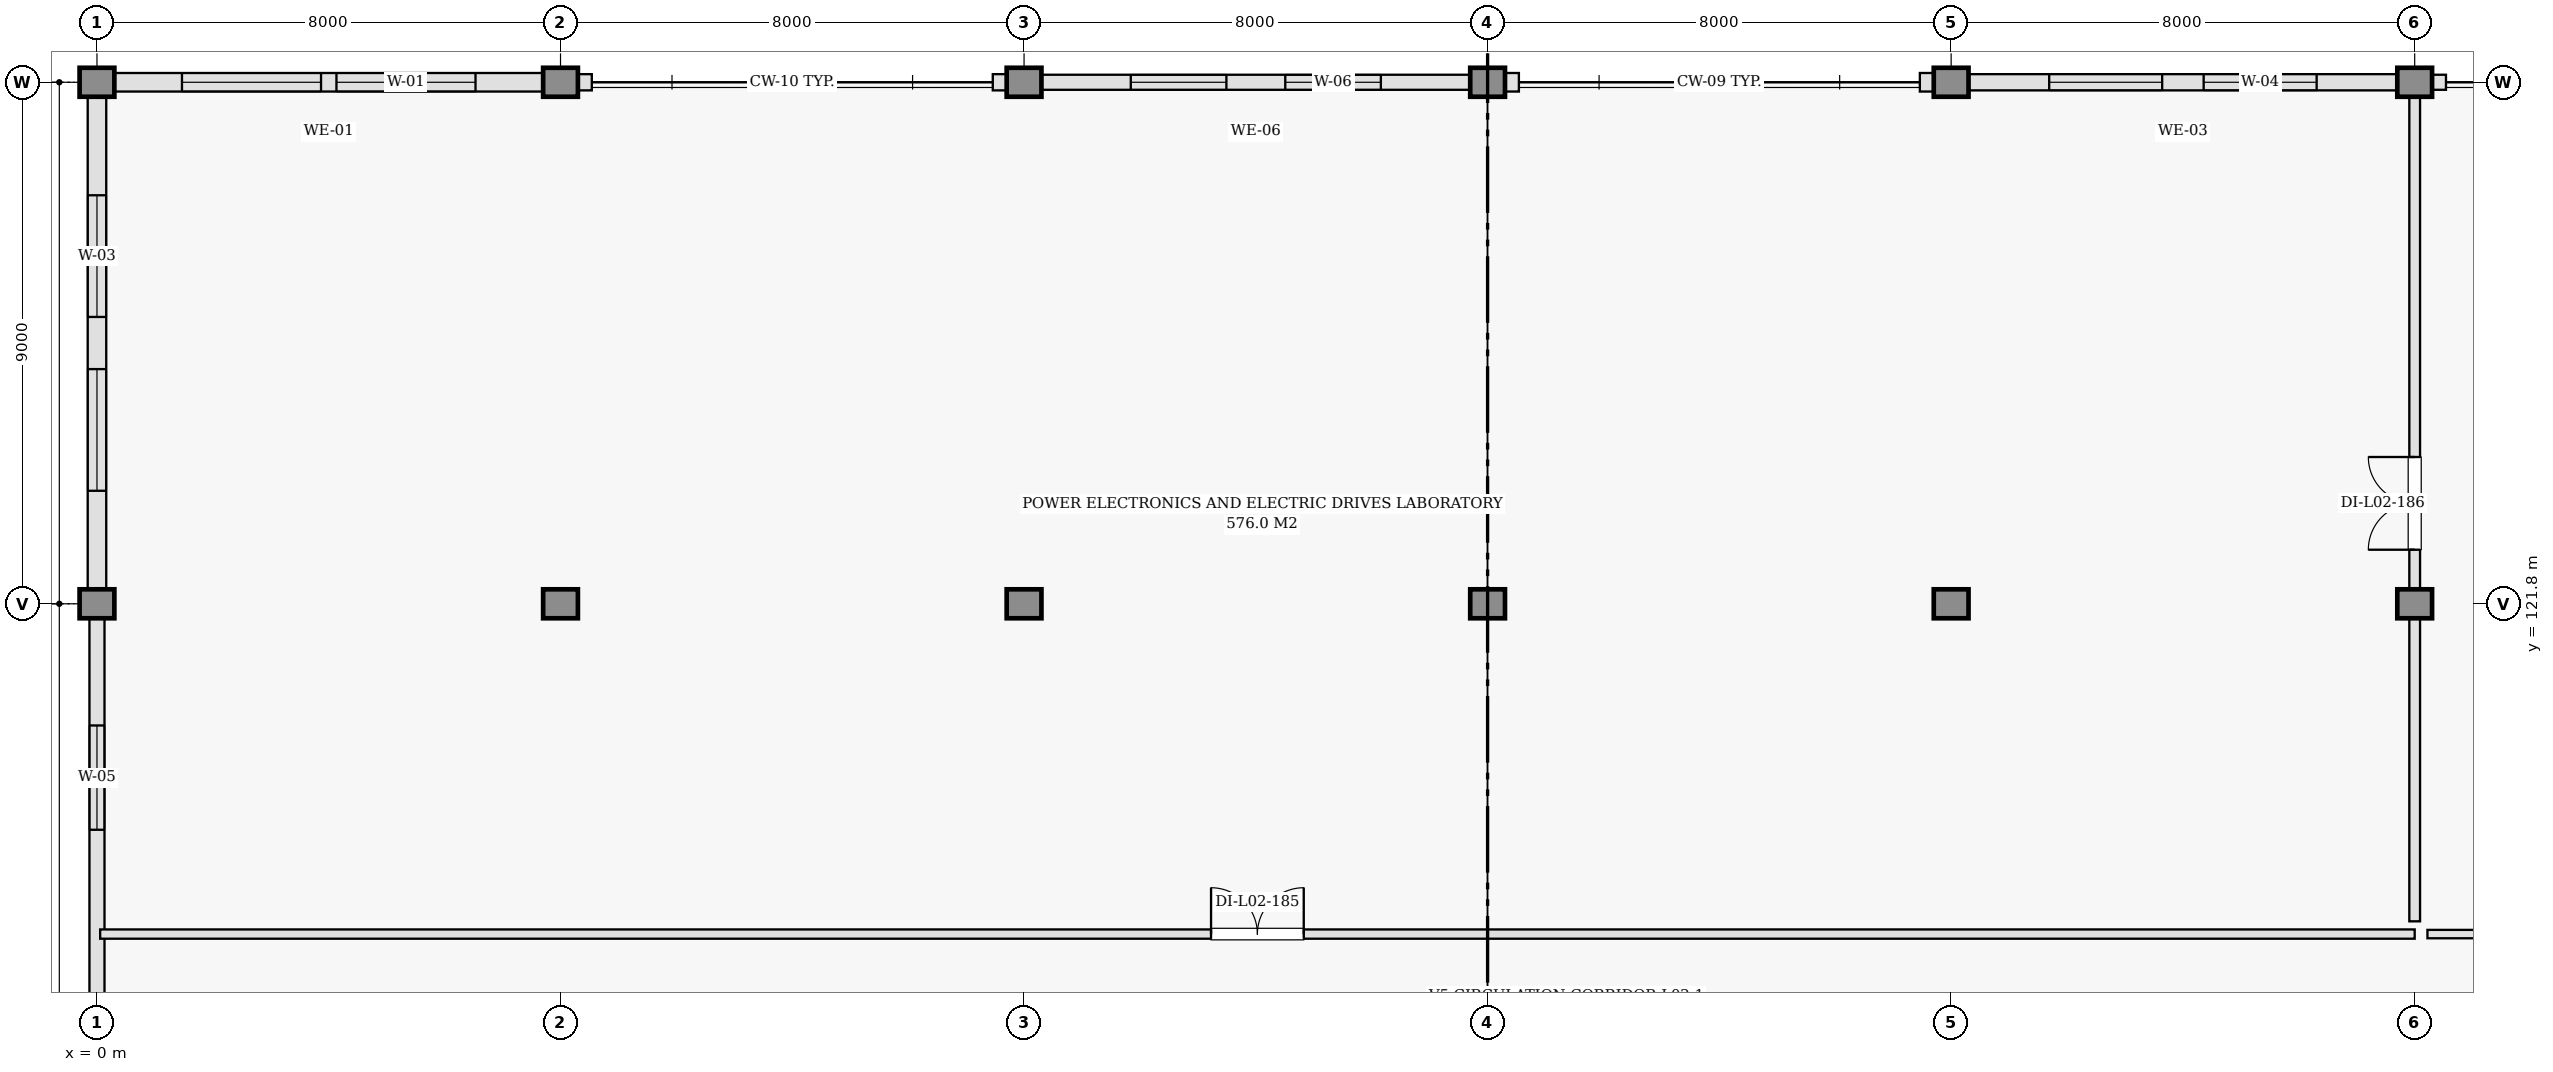
"""IFC4 building model, lengths in metres.
Left out: names, types, materials, properties, quantities, classifications, styles, units other than length and angle.
Written with IfcOpenShell. Run it as: python <this file> out.ifc"""

import sys

from ifc_helpers import new_model, si_unit, direction, frame, frame_2d, origin, origin_2d, place, context, subcontext, project, spatial, rectangle, extrude, element, fill, save


model = new_model("IFC4")
c1 = context("Model", 3, precision=1e-05, world=origin(), true_north=direction((0.0, 1.0)))
c2 = subcontext(c1, "Body", "Model", "MODEL_VIEW")
j1 = project(units=[si_unit("LENGTHUNIT", "METRE"), si_unit("PLANEANGLEUNIT", "RADIAN")], contexts=[c1])
p1 = place(None, origin())
s1 = spatial("IfcSite", under=j1, at=p1, CompositionType="ELEMENT")
p2 = place(p1, origin())
s2 = spatial("IfcBuilding", under=s1, at=p2, CompositionType="ELEMENT")
p3 = place(p2, frame((0.0, 0.0, 9.6)))
s3 = spatial("IfcBuildingStorey", under=s2, at=p3, CompositionType="ELEMENT", Elevation=9.6)
for number, where, z_axis, x_axis in (
    (1, (0.0, 121.8, 0.0), (0.0, 0.0, 1.0), (1.0, 0.0, 0.0)),
    (2, (0.0, 130.8, 0.0), (0.0, 0.0, 1.0), (1.0, 0.0, 0.0)),
    (3, (8.0, 121.8, 0.0), (0.0, 0.0, 1.0), (1.0, 0.0, 0.0)),
    (4, (8.0, 130.8, 0.0), (0.0, 0.0, 1.0), (1.0, 0.0, 0.0)),
    (5, (16.0, 121.8, 0.0), (0.0, 0.0, 1.0), (1.0, 0.0, 0.0)),
    (6, (16.0, 130.8, 0.0), (0.0, 0.0, 1.0), (1.0, 0.0, 0.0)),
    (7, (24.0, 121.8, 0.0), (0.0, 0.0, 1.0), (1.0, 0.0, 0.0)),
    (8, (24.0, 130.8, 0.0), (0.0, 0.0, 1.0), (1.0, 0.0, 0.0)),
    (9, (32.0, 121.8, 0.0), (0.0, 0.0, 1.0), (1.0, 0.0, 0.0)),
    (10, (32.0, 130.8, 0.0), (0.0, 0.0, 1.0), (1.0, 0.0, 0.0)),
    (11, (40.0, 121.8, 0.0), (0.0, 0.0, 1.0), (1.0, 0.0, 0.0)),
    (12, (40.0, 130.8, 0.0), (0.0, 0.0, 1.0), (1.0, 0.0, 0.0)),
):
    element("IfcColumn", number, at=place(p3, frame(where, z_axis=z_axis, x_axis=x_axis)), inside=s3, PredefinedType="COLUMN", context=c2, shape_type="SweptSolid", body=[
        extrude(rectangle(XDim=0.5, YDim=0.5, at=origin_2d()), origin(), (0.0, 0.0, 1.0), 4.2),
    ])
p4 = place(p3, frame((40.54, 130.8, 0.0), z_axis=(0.0, 0.0, 1.0), x_axis=(-1.0, 0.0, 0.0)))
e13 = element("IfcWall", 13, at=p4, inside=s3, PredefinedType="SOLIDWALL", context=c2, shape_type="SweptSolid", body=[
    extrude(rectangle(XDim=0.54, YDim=0.26, at=frame_2d((0.27, 0.0))), origin(), (0.0, 0.0, 1.0), 3.175),
])
p5 = place(p3, frame((40.0, 130.8, 0.0), z_axis=(0.0, 0.0, 1.0), x_axis=(-1.0, 0.0, 0.0)))
e14 = element("IfcWall", 14, at=p5, inside=s3, PredefinedType="SOLIDWALL", context=c2, shape_type="SweptSolid", body=[
    extrude(rectangle(XDim=8.0, YDim=0.28, at=frame_2d((4.0, 0.0))), origin(), (0.0, 0.0, 1.0), 3.175),
])
p6 = place(p5, frame((1.692, 0.0, 0.95)))
e15 = element("IfcOpeningElement", 15, at=p6, cuts=e14, PredefinedType="OPENING", context=c2, shape_type="SweptSolid", body=[
    extrude(rectangle(XDim=1.95, YDim=1.75, at=frame_2d((0.975, 0.875))), frame((0.0, 0.15, 0.0), z_axis=(0.0, -1.0, 0.0), x_axis=(1.0, 0.0, 0.0)), (0.0, 0.0, 1.0), 0.3),
])
p7 = place(p5, frame((4.358, 0.0, 0.95)))
e16 = element("IfcOpeningElement", 16, at=p7, cuts=e14, PredefinedType="OPENING", context=c2, shape_type="SweptSolid", body=[
    extrude(rectangle(XDim=1.95, YDim=1.75, at=frame_2d((0.975, 0.875))), frame((0.0, 0.15, 0.0), z_axis=(0.0, -1.0, 0.0), x_axis=(1.0, 0.0, 0.0)), (0.0, 0.0, 1.0), 0.3),
])
for number, where, z_axis, x_axis in (
    (17, (32.0, 130.8, 0.0), (0.0, 0.0, 1.0), (-1.0, 0.0, 0.0)),
    (18, (24.54, 130.8, 0.0), (0.0, 0.0, 1.0), (-1.0, 0.0, 0.0)),
):
    element("IfcWall", number, at=place(p3, frame(where, z_axis=z_axis, x_axis=x_axis)), inside=s3, PredefinedType="SOLIDWALL", context=c2, shape_type="SweptSolid", body=[
        extrude(rectangle(XDim=0.54, YDim=0.32, at=frame_2d((0.27, 0.0))), origin(), (0.0, 0.0, 1.0), 3.175),
    ])
p8 = place(p3, frame((24.0, 130.8, 0.0), z_axis=(0.0, 0.0, 1.0), x_axis=(-1.0, 0.0, 0.0)))
e19 = element("IfcWall", 19, at=p8, inside=s3, PredefinedType="SOLIDWALL", context=c2, shape_type="SweptSolid", body=[
    extrude(rectangle(XDim=8.0, YDim=0.26, at=frame_2d((4.0, 0.0))), origin(), (0.0, 0.0, 1.0), 3.175),
])
p9 = place(p8, frame((1.842, 0.0, 0.95)))
e20 = element("IfcOpeningElement", 20, at=p9, cuts=e19, PredefinedType="OPENING", context=c2, shape_type="SweptSolid", body=[
    extrude(rectangle(XDim=1.65, YDim=1.7, at=frame_2d((0.825, 0.85))), frame((0.0, 0.14, 0.0), z_axis=(0.0, -1.0, 0.0), x_axis=(1.0, 0.0, 0.0)), (0.0, 0.0, 1.0), 0.28),
])
p10 = place(p8, frame((4.508, 0.0, 0.95)))
e21 = element("IfcOpeningElement", 21, at=p10, cuts=e19, PredefinedType="OPENING", context=c2, shape_type="SweptSolid", body=[
    extrude(rectangle(XDim=1.65, YDim=1.7, at=frame_2d((0.825, 0.85))), frame((0.0, 0.14, 0.0), z_axis=(0.0, -1.0, 0.0), x_axis=(1.0, 0.0, 0.0)), (0.0, 0.0, 1.0), 0.28),
])
for number, where, z_axis, x_axis in (
    (22, (16.0, 130.8, 0.0), (0.0, 0.0, 1.0), (-1.0, 0.0, 0.0)),
    (23, (8.54, 130.8, 0.0), (0.0, 0.0, 1.0), (-1.0, 0.0, 0.0)),
):
    element("IfcWall", number, at=place(p3, frame(where, z_axis=z_axis, x_axis=x_axis)), inside=s3, PredefinedType="SOLIDWALL", context=c2, shape_type="SweptSolid", body=[
        extrude(rectangle(XDim=0.54, YDim=0.28, at=frame_2d((0.27, 0.0))), origin(), (0.0, 0.0, 1.0), 3.175),
    ])
p11 = place(p3, frame((8.0, 130.8, 0.0), z_axis=(0.0, 0.0, 1.0), x_axis=(-1.0, 0.0, 0.0)))
e24 = element("IfcWall", 24, at=p11, inside=s3, PredefinedType="SOLIDWALL", context=c2, shape_type="SweptSolid", body=[
    extrude(rectangle(XDim=8.0, YDim=0.32, at=frame_2d((4.0, 0.0))), origin(), (0.0, 0.0, 1.0), 3.175),
])
p12 = place(p11, frame((1.467, 0.0, 0.95)))
e25 = element("IfcOpeningElement", 25, at=p12, cuts=e24, PredefinedType="OPENING", context=c2, shape_type="SweptSolid", body=[
    extrude(rectangle(XDim=2.4, YDim=1.8, at=frame_2d((1.2, 0.9))), frame((0.0, 0.17, 0.0), z_axis=(0.0, -1.0, 0.0), x_axis=(1.0, 0.0, 0.0)), (0.0, 0.0, 1.0), 0.34),
])
p13 = place(p11, frame((4.133, 0.0, 0.95)))
e26 = element("IfcOpeningElement", 26, at=p13, cuts=e24, PredefinedType="OPENING", context=c2, shape_type="SweptSolid", body=[
    extrude(rectangle(XDim=2.4, YDim=1.8, at=frame_2d((1.2, 0.9))), frame((0.0, 0.17, 0.0), z_axis=(0.0, -1.0, 0.0), x_axis=(1.0, 0.0, 0.0)), (0.0, 0.0, 1.0), 0.34),
])
p14 = place(p3, frame((0.0, 130.8, 0.0), z_axis=(0.0, 0.0, 1.0), x_axis=(0.0, -1.0, 0.0)))
e27 = element("IfcWall", 27, at=p14, inside=s3, PredefinedType="SOLIDWALL", context=c2, shape_type="SweptSolid", body=[
    extrude(rectangle(XDim=9.0, YDim=0.32, at=frame_2d((4.5, 0.0))), origin(), (0.0, 0.0, 1.0), 3.175),
])
p15 = place(p14, frame((1.95, 0.0, 0.95)))
e28 = element("IfcOpeningElement", 28, at=p15, cuts=e27, PredefinedType="OPENING", context=c2, shape_type="SweptSolid", body=[
    extrude(rectangle(XDim=2.1, YDim=1.8, at=frame_2d((1.05, 0.9))), frame((0.0, 0.17, 0.0), z_axis=(0.0, -1.0, 0.0), x_axis=(1.0, 0.0, 0.0)), (0.0, 0.0, 1.0), 0.34),
])
p16 = place(p14, frame((4.95, 0.0, 0.95)))
e29 = element("IfcOpeningElement", 29, at=p16, cuts=e27, PredefinedType="OPENING", context=c2, shape_type="SweptSolid", body=[
    extrude(rectangle(XDim=2.1, YDim=1.8, at=frame_2d((1.05, 0.9))), frame((0.0, 0.17, 0.0), z_axis=(0.0, -1.0, 0.0), x_axis=(1.0, 0.0, 0.0)), (0.0, 0.0, 1.0), 0.34),
])
p17 = place(p3, frame((0.0, 121.8, 0.0), z_axis=(0.0, 0.0, 1.0), x_axis=(0.0, -1.0, 0.0)))
e30 = element("IfcWall", 30, at=p17, inside=s3, PredefinedType="SOLIDWALL", context=c2, shape_type="SweptSolid", body=[
    extrude(rectangle(XDim=9.0, YDim=0.26, at=frame_2d((4.5, 0.0))), origin(), (0.0, 0.0, 1.0), 3.175),
])
p18 = place(p17, frame((2.1, 0.0, 0.95)))
e31 = element("IfcOpeningElement", 31, at=p18, cuts=e30, PredefinedType="OPENING", context=c2, shape_type="SweptSolid", body=[
    extrude(rectangle(XDim=1.8, YDim=1.75, at=frame_2d((0.9, 0.875))), frame((0.0, 0.14, 0.0), z_axis=(0.0, -1.0, 0.0), x_axis=(1.0, 0.0, 0.0)), (0.0, 0.0, 1.0), 0.28),
])
p19 = place(p3, frame((0.055, 116.1, 0.0), z_axis=(0.0, 0.0, 1.0), x_axis=(1.0, 0.0, 0.0)))
e32 = element("IfcWall", 32, at=p19, inside=s3, PredefinedType="PARTITIONING", context=c2, shape_type="SweptSolid", body=[
    extrude(rectangle(XDim=39.945, YDim=0.16, at=frame_2d((19.973, 0.0))), origin(), (0.0, 0.0, 1.0), 3.275),
])
p20 = place(p19, frame((19.172, 0.0, 0.0)))
e33 = element("IfcOpeningElement", 33, at=p20, cuts=e32, PredefinedType="OPENING", context=c2, shape_type="SweptSolid", body=[
    extrude(rectangle(XDim=1.6, YDim=2.2, at=frame_2d((0.8, 1.1))), frame((0.0, 0.09, 0.0), z_axis=(0.0, -1.0, 0.0), x_axis=(1.0, 0.0, 0.0)), (0.0, 0.0, 1.0), 0.18),
])
p21 = place(p3, frame((40.0, 116.32, 0.0), z_axis=(0.0, 0.0, 1.0), x_axis=(0.0, 1.0, 0.0)))
e34 = element("IfcWall", 34, at=p21, inside=s3, PredefinedType="PARTITIONING", context=c2, shape_type="SweptSolid", body=[
    extrude(rectangle(XDim=14.425, YDim=0.185, at=frame_2d((7.212, 0.0))), origin(), (0.0, 0.0, 1.0), 3.275),
])
p22 = place(p21, frame((6.413, 0.0, 0.0)))
e35 = element("IfcOpeningElement", 35, at=p22, cuts=e34, PredefinedType="OPENING", context=c2, shape_type="SweptSolid", body=[
    extrude(rectangle(XDim=1.6, YDim=2.2, at=frame_2d((0.8, 1.1))), frame((0.0, 0.103, 0.0), z_axis=(0.0, -1.0, 0.0), x_axis=(1.0, 0.0, 0.0)), (0.0, 0.0, 1.0), 0.205),
])
p23 = place(p3, frame((40.22, 116.1, 0.0), z_axis=(0.0, 0.0, 1.0), x_axis=(1.0, 0.0, 0.0)))
e36 = element("IfcWall", 36, at=p23, inside=s3, PredefinedType="PARTITIONING", context=c2, shape_type="SweptSolid", body=[
    extrude(rectangle(XDim=39.78, YDim=0.145, at=frame_2d((19.89, 0.0))), origin(), (0.0, 0.0, 1.0), 3.025),
])
p24 = place(p6, origin())
e37 = element("IfcWindow", 37, at=p24, inside=s3, PartitioningType="DOUBLE_PANEL_VERTICAL", PredefinedType="WINDOW", context=c2, shape_type="SweptSolid", body=[
    extrude(rectangle(XDim=1.95, YDim=1.75, at=frame_2d((0.975, 0.875))), frame((0.0, 0.03, 0.0), z_axis=(0.0, -1.0, 0.0), x_axis=(1.0, 0.0, 0.0)), (0.0, 0.0, 1.0), 0.06),
])
fill(e15, e37)
p25 = place(p7, origin())
e38 = element("IfcWindow", 38, at=p25, inside=s3, PartitioningType="DOUBLE_PANEL_VERTICAL", PredefinedType="WINDOW", context=c2, shape_type="SweptSolid", body=[
    extrude(rectangle(XDim=1.95, YDim=1.75, at=frame_2d((0.975, 0.875))), frame((0.0, 0.03, 0.0), z_axis=(0.0, -1.0, 0.0), x_axis=(1.0, 0.0, 0.0)), (0.0, 0.0, 1.0), 0.06),
])
fill(e16, e38)
p26 = place(p9, origin())
e39 = element("IfcWindow", 39, at=p26, inside=s3, PartitioningType="DOUBLE_PANEL_VERTICAL", PredefinedType="WINDOW", context=c2, shape_type="SweptSolid", body=[
    extrude(rectangle(XDim=1.65, YDim=1.7, at=frame_2d((0.825, 0.85))), frame((0.0, 0.03, 0.0), z_axis=(0.0, -1.0, 0.0), x_axis=(1.0, 0.0, 0.0)), (0.0, 0.0, 1.0), 0.06),
])
fill(e20, e39)
p27 = place(p10, origin())
e40 = element("IfcWindow", 40, at=p27, inside=s3, PartitioningType="DOUBLE_PANEL_VERTICAL", PredefinedType="WINDOW", context=c2, shape_type="SweptSolid", body=[
    extrude(rectangle(XDim=1.65, YDim=1.7, at=frame_2d((0.825, 0.85))), frame((0.0, 0.03, 0.0), z_axis=(0.0, -1.0, 0.0), x_axis=(1.0, 0.0, 0.0)), (0.0, 0.0, 1.0), 0.06),
])
fill(e21, e40)
p28 = place(p12, origin())
e41 = element("IfcWindow", 41, at=p28, inside=s3, PartitioningType="DOUBLE_PANEL_VERTICAL", PredefinedType="WINDOW", context=c2, shape_type="SweptSolid", body=[
    extrude(rectangle(XDim=2.4, YDim=1.8, at=frame_2d((1.2, 0.9))), frame((0.0, 0.03, 0.0), z_axis=(0.0, -1.0, 0.0), x_axis=(1.0, 0.0, 0.0)), (0.0, 0.0, 1.0), 0.06),
])
fill(e25, e41)
p29 = place(p13, origin())
e42 = element("IfcWindow", 42, at=p29, inside=s3, PartitioningType="DOUBLE_PANEL_VERTICAL", PredefinedType="WINDOW", context=c2, shape_type="SweptSolid", body=[
    extrude(rectangle(XDim=2.4, YDim=1.8, at=frame_2d((1.2, 0.9))), frame((0.0, 0.03, 0.0), z_axis=(0.0, -1.0, 0.0), x_axis=(1.0, 0.0, 0.0)), (0.0, 0.0, 1.0), 0.06),
])
fill(e26, e42)
p30 = place(p15, origin())
e43 = element("IfcWindow", 43, at=p30, inside=s3, PartitioningType="DOUBLE_PANEL_VERTICAL", PredefinedType="WINDOW", context=c2, shape_type="SweptSolid", body=[
    extrude(rectangle(XDim=2.1, YDim=1.8, at=frame_2d((1.05, 0.9))), frame((0.0, 0.03, 0.0), z_axis=(0.0, -1.0, 0.0), x_axis=(1.0, 0.0, 0.0)), (0.0, 0.0, 1.0), 0.06),
])
fill(e28, e43)
p31 = place(p16, origin())
e44 = element("IfcWindow", 44, at=p31, inside=s3, PartitioningType="DOUBLE_PANEL_VERTICAL", PredefinedType="WINDOW", context=c2, shape_type="SweptSolid", body=[
    extrude(rectangle(XDim=2.1, YDim=1.8, at=frame_2d((1.05, 0.9))), frame((0.0, 0.03, 0.0), z_axis=(0.0, -1.0, 0.0), x_axis=(1.0, 0.0, 0.0)), (0.0, 0.0, 1.0), 0.06),
])
fill(e29, e44)
p32 = place(p18, origin())
e45 = element("IfcWindow", 45, at=p32, inside=s3, PartitioningType="DOUBLE_PANEL_VERTICAL", PredefinedType="WINDOW", context=c2, shape_type="SweptSolid", body=[
    extrude(rectangle(XDim=1.8, YDim=1.75, at=frame_2d((0.9, 0.875))), frame((0.0, 0.03, 0.0), z_axis=(0.0, -1.0, 0.0), x_axis=(1.0, 0.0, 0.0)), (0.0, 0.0, 1.0), 0.06),
])
fill(e31, e45)
p33 = place(p20, origin())
e46 = element("IfcDoor", 46, at=p33, inside=s3, OperationType="DOUBLE_DOOR_SINGLE_SWING", PredefinedType="DOOR", context=c2, shape_type="SweptSolid", body=[
    extrude(rectangle(XDim=1.6, YDim=2.2, at=frame_2d((0.8, 1.1))), frame((0.0, 0.025, 0.0), z_axis=(0.0, -1.0, 0.0), x_axis=(1.0, 0.0, 0.0)), (0.0, 0.0, 1.0), 0.05),
])
fill(e33, e46)
p34 = place(p22, origin())
e47 = element("IfcDoor", 47, at=p34, inside=s3, OperationType="DOUBLE_DOOR_SINGLE_SWING", PredefinedType="DOOR", context=c2, shape_type="SweptSolid", body=[
    extrude(rectangle(XDim=1.6, YDim=2.2, at=frame_2d((0.8, 1.1))), frame((0.0, 0.025, 0.0), z_axis=(0.0, -1.0, 0.0), x_axis=(1.0, 0.0, 0.0)), (0.0, 0.0, 1.0), 0.05),
])
fill(e35, e47)
save(model, sys.argv[1])
